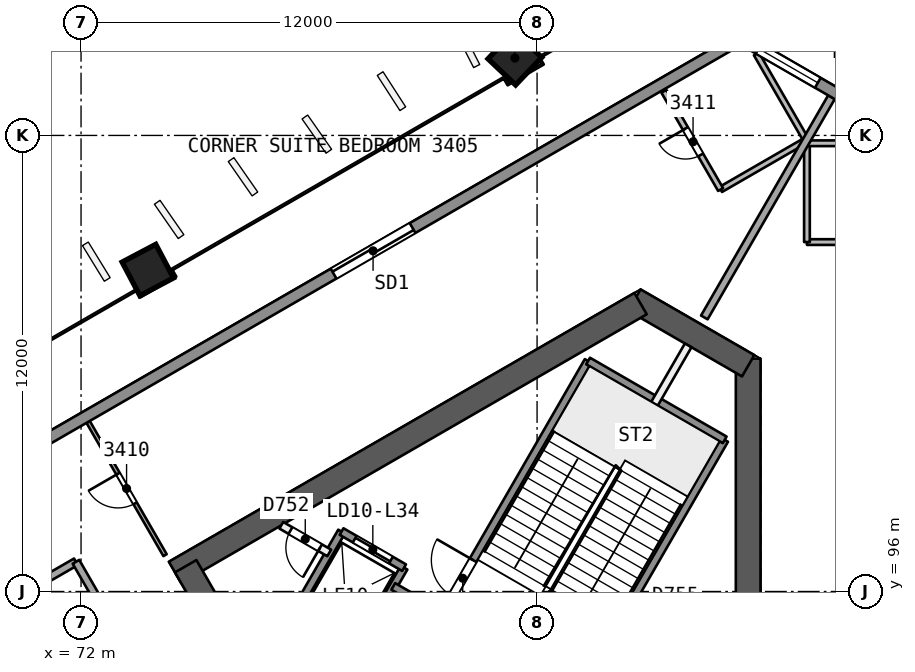
"""IFC4 building model, lengths in metres.
Left out: names, types, materials, properties, quantities, classifications, styles, units other than length and angle.
Written with IfcOpenShell. Run it as: python <this file> out.ifc"""

import sys

from ifc_helpers import new_model, si_unit, direction, frame, frame_2d, origin, origin_2d, place, context, subcontext, project, spatial, rectangle, extrude, element, fill, save


model = new_model("IFC4")
c1 = context("Model", 3, precision=1e-05, world=origin(), true_north=direction((0.0, 1.0)))
c2 = subcontext(c1, "Body", "Model", "MODEL_VIEW")
j1 = project(units=[si_unit("LENGTHUNIT", "METRE"), si_unit("PLANEANGLEUNIT", "RADIAN")], contexts=[c1])
p1 = place(None, origin())
s1 = spatial("IfcSite", under=j1, at=p1, CompositionType="ELEMENT")
p2 = place(p1, origin())
s2 = spatial("IfcBuilding", under=s1, at=p2, CompositionType="ELEMENT")
p3 = place(p2, frame((0.0, 0.0, 140.1)))
s3 = spatial("IfcBuildingStorey", under=s2, at=p3, CompositionType="ELEMENT", Elevation=140.1)
p4 = place(p3, frame((89.555, 88.119, 0.0), z_axis=(0.0, 0.0, 1.0), x_axis=(0.0, 1.0, 0.0)))
e1 = element("IfcWall", 1, at=p4, inside=s3, PredefinedType="SHEAR", context=c2, shape_type="SweptSolid", body=[
    extrude(rectangle(XDim=14.009, YDim=0.65, at=frame_2d((7.004, 0.0))), origin(), (0.0, 0.0, 1.0), 3.7),
])
p5 = place(p3, frame((89.555, 101.94, 0.0), z_axis=(0.0, 0.0, 1.0), x_axis=(-0.866031550877, 0.499989352773, 0.0)))
e2 = element("IfcWall", 2, at=p5, inside=s3, PredefinedType="SHEAR", context=c2, shape_type="SweptSolid", body=[
    extrude(rectangle(XDim=3.458, YDim=0.65, at=frame_2d((1.729, 0.0))), origin(), (0.0, 0.0, 1.0), 3.7),
])
p6 = place(p3, frame((86.723, 103.575, 0.0), z_axis=(0.0, 0.0, 1.0), x_axis=(-0.866031824457, -0.499988878904, 0.0)))
e3 = element("IfcWall", 3, at=p6, inside=s3, PredefinedType="SHEAR", context=c2, shape_type="SweptSolid", body=[
    extrude(rectangle(XDim=14.146, YDim=0.65, at=frame_2d((7.073, 0.0))), origin(), (0.0, 0.0, 1.0), 3.7),
])
p7 = place(p3, frame((74.754, 96.665, 0.0), z_axis=(0.0, 0.0, 1.0), x_axis=(0.500011799426, -0.866018591275, 0.0)))
e4 = element("IfcWall", 4, at=p7, inside=s3, PredefinedType="SHEAR", context=c2, shape_type="SweptSolid", body=[
    extrude(rectangle(XDim=10.055, YDim=0.65, at=frame_2d((5.027, 0.0))), origin(), (0.0, 0.0, 1.0), 3.7),
])
p8 = place(p7, frame((7.905, 0.0, 0.0)))
e5 = element("IfcOpeningElement", 5, at=p8, cuts=e4, PredefinedType="OPENING", context=c2, shape_type="SweptSolid", body=[
    extrude(rectangle(XDim=1.2, YDim=2.1, at=frame_2d((0.6, 1.05))), frame((0.0, 0.335, 0.0), z_axis=(0.0, -1.0, 0.0), x_axis=(1.0, 0.0, 0.0)), (0.0, 0.0, 1.0), 0.671),
])
p9 = place(p3, frame((93.096, 111.344, 0.0), z_axis=(-0.017607037296, -0.030466109479, 0.999380712447), x_axis=(0.86581098392, -0.500371202332, 2.457e-09)))
e6 = element("IfcColumn", 6, at=p9, inside=s3, PredefinedType="COLUMN", context=c2, shape_type="SweptSolid", body=[
    extrude(rectangle(XDim=2.4, YDim=2.4, at=origin_2d()), origin(), (0.0, 0.0, 1.0), 3.702),
])
p10 = place(p3, frame((83.426, 110.069, 0.0), z_axis=(-0.008376454378, -0.028163354484, 0.999568237028), x_axis=(0.865850871468, 0.499846877556, 0.02133933866)))
e7 = element("IfcColumn", 7, at=p10, inside=s3, PredefinedType="COLUMN", context=c2, shape_type="SweptSolid", body=[
    extrude(rectangle(XDim=1.0, YDim=1.0, at=origin_2d()), origin(), (0.0, 0.0, 1.0), 3.702),
])
p11 = place(p3, frame((73.756, 104.486, 0.0), z_axis=(0.000857578916, -0.022824792675, 0.999739112668), x_axis=(0.866060219769, 0.499825848733, 0.01066848966)))
e8 = element("IfcColumn", 8, at=p11, inside=s3, PredefinedType="COLUMN", context=c2, shape_type="SweptSolid", body=[
    extrude(rectangle(XDim=1.0, YDim=1.0, at=origin_2d()), origin(), (0.0, 0.0, 1.0), 3.701),
])
p12 = place(p3, frame((94.087, 105.194, 0.0), z_axis=(0.0, 0.0, 1.0), x_axis=(-1.0, 0.0, 0.0)))
e9 = element("IfcWall", 9, at=p12, inside=s3, PredefinedType="PARTITIONING", context=c2, shape_type="SweptSolid", body=[
    extrude(rectangle(XDim=2.986, YDim=0.15, at=frame_2d((1.493, 0.0))), origin(), (0.0, 0.0, 1.0), 3.25),
])
p13 = place(p12, frame((1.136, 0.0, 0.0)))
e10 = element("IfcOpeningElement", 10, at=p13, cuts=e9, PredefinedType="OPENING", context=c2, shape_type="SweptSolid", body=[
    extrude(rectangle(XDim=0.8, YDim=2.1, at=frame_2d((0.4, 1.05))), frame((0.0, 0.085, 0.0), z_axis=(0.0, -1.0, 0.0), x_axis=(1.0, 0.0, 0.0)), (0.0, 0.0, 1.0), 0.171),
])
p14 = place(p3, frame((91.102, 105.194, 0.0), z_axis=(0.0, 0.0, 1.0), x_axis=(0.0, 1.0, 0.0)))
e11 = element("IfcWall", 11, at=p14, inside=s3, PredefinedType="PARTITIONING", context=c2, shape_type="SweptSolid", body=[
    extrude(rectangle(XDim=2.6, YDim=0.15, at=frame_2d((1.3, 0.0))), origin(), (0.0, 0.0, 1.0), 3.25),
])
p15 = place(p3, frame((91.102, 107.794, 0.0), z_axis=(0.0, 0.0, 1.0), x_axis=(1.0, 0.0, 0.0)))
e12 = element("IfcWall", 12, at=p15, inside=s3, PredefinedType="PARTITIONING", context=c2, shape_type="SweptSolid", body=[
    extrude(rectangle(XDim=2.744, YDim=0.15, at=frame_2d((1.372, 0.0))), origin(), (0.0, 0.0, 1.0), 3.25),
])
p16 = place(p3, frame((91.747, 109.006, 0.0), z_axis=(0.0, 0.0, 1.0), x_axis=(-0.499973018359, -0.866040981082, 0.0)))
e13 = element("IfcWall", 13, at=p16, inside=s3, PredefinedType="PARTITIONING", context=c2, shape_type="SweptSolid", body=[
    extrude(rectangle(XDim=6.691, YDim=0.2, at=frame_2d((3.346, 0.0))), origin(), (0.0, 0.0, 1.0), 3.25),
])
p17 = place(p3, frame((74.21, 96.956, 0.0), z_axis=(0.0, 0.0, 1.0), x_axis=(-0.499997320042, 0.866026951053, 0.0)))
e14 = element("IfcWall", 14, at=p17, inside=s3, PredefinedType="PARTITIONING", context=c2, shape_type="SweptSolid", body=[
    extrude(rectangle(XDim=4.049, YDim=0.1, at=frame_2d((2.025, 0.0))), origin(), (0.0, 0.0, 1.0), 3.25),
])
p18 = place(p17, frame((1.575, 0.0, 0.0)))
e15 = element("IfcOpeningElement", 15, at=p18, cuts=e14, PredefinedType="OPENING", context=c2, shape_type="SweptSolid", body=[
    extrude(rectangle(XDim=0.9, YDim=2.1, at=frame_2d((0.45, 1.05))), frame((0.0, 0.061, 0.0), z_axis=(0.0, -1.0, 0.0), x_axis=(1.0, 0.0, 0.0)), (0.0, 0.0, 1.0), 0.121),
])
p19 = place(p3, frame((70.134, 95.781, 0.0), z_axis=(0.0, 0.0, 1.0), x_axis=(0.866010750942, 0.50002537861, 0.0)))
e16 = element("IfcWall", 16, at=p19, inside=s3, PredefinedType="PARTITIONING", context=c2, shape_type="SweptSolid", body=[
    extrude(rectangle(XDim=2.0, YDim=0.2, at=frame_2d((1.0, 0.0))), origin(), (0.0, 0.0, 1.0), 3.25),
])
p20 = place(p3, frame((71.866, 96.781, 0.0), z_axis=(0.0, 0.0, 1.0), x_axis=(0.5000018851, -0.866024315419, 0.0)))
e17 = element("IfcWall", 17, at=p20, inside=s3, PredefinedType="PARTITIONING", context=c2, shape_type="SweptSolid", body=[
    extrude(rectangle(XDim=9.0, YDim=0.2, at=frame_2d((4.5, 0.0))), origin(), (0.0, 0.0, 1.0), 3.25),
])
p21 = place(p3, frame((66.786, 97.345, 0.0), z_axis=(0.0, 0.0, 1.0), x_axis=(0.500002984678, -0.866023680573, 0.0)))
e18 = element("IfcWall", 18, at=p21, inside=s3, PredefinedType="PARTITIONING", context=c2, shape_type="SweptSolid", body=[
    extrude(rectangle(XDim=12.028, YDim=0.2, at=frame_2d((6.014, 0.0))), origin(), (0.0, 0.0, 1.0), 3.25),
])
p22 = place(p3, frame((89.77, 110.147, 0.0), z_axis=(0.0, 0.0, 1.0), x_axis=(0.500015355683, -0.866016537995, 0.0)))
e19 = element("IfcWall", 19, at=p22, inside=s3, PredefinedType="PARTITIONING", context=c2, shape_type="SweptSolid", body=[
    extrude(rectangle(XDim=2.622, YDim=0.15, at=frame_2d((1.311, 0.0))), origin(), (0.0, 0.0, 1.0), 3.25),
])
p23 = place(p3, frame((91.081, 107.877, 0.0), z_axis=(0.0, 0.0, 1.0), x_axis=(-0.866021400173, -0.500006934395, 0.0)))
e20 = element("IfcWall", 20, at=p23, inside=s3, PredefinedType="PARTITIONING", context=c2, shape_type="SweptSolid", body=[
    extrude(rectangle(XDim=2.6, YDim=0.15, at=frame_2d((1.3, 0.0))), origin(), (0.0, 0.0, 1.0), 3.25),
])
p24 = place(p3, frame((88.829, 106.577, 0.0), z_axis=(0.0, 0.0, 1.0), x_axis=(-0.499956044622, 0.866050779946, 0.0)))
e21 = element("IfcWall", 21, at=p24, inside=s3, PredefinedType="PARTITIONING", context=c2, shape_type="SweptSolid", body=[
    extrude(rectangle(XDim=2.986, YDim=0.15, at=frame_2d((1.493, 0.0))), origin(), (0.0, 0.0, 1.0), 3.25),
])
p25 = place(p24, frame((1.05, 0.0, 0.0)))
e22 = element("IfcOpeningElement", 22, at=p25, cuts=e21, PredefinedType="OPENING", context=c2, shape_type="SweptSolid", body=[
    extrude(rectangle(XDim=0.8, YDim=2.1, at=frame_2d((0.4, 1.05))), frame((0.0, 0.085, 0.0), z_axis=(0.0, -1.0, 0.0), x_axis=(1.0, 0.0, 0.0)), (0.0, 0.0, 1.0), 0.171),
])
p26 = place(p3, frame((89.365, 110.553, 0.0), z_axis=(0.0, 0.0, 1.0), x_axis=(0.866019999656, -0.500009360108, 0.0)))
e23 = element("IfcWall", 23, at=p26, inside=s3, PredefinedType="SOLIDWALL", context=c2, shape_type="SweptSolid", body=[
    extrude(rectangle(XDim=5.672, YDim=0.3, at=frame_2d((2.836, 0.0))), origin(), (0.0, 0.0, 1.0), 3.25),
])
p27 = place(p26, frame((3.396, 0.0, 0.9)))
e24 = element("IfcOpeningElement", 24, at=p27, cuts=e23, PredefinedType="OPENING", context=c2, shape_type="SweptSolid", body=[
    extrude(rectangle(XDim=1.8, YDim=1.5, at=frame_2d((0.9, 0.75))), frame((0.0, 0.161, 0.0), z_axis=(0.0, -1.0, 0.0), x_axis=(1.0, 0.0, 0.0)), (0.0, 0.0, 1.0), 0.321),
])
p28 = place(p26, frame((0.535, 0.0, 0.9)))
e25 = element("IfcOpeningElement", 25, at=p28, cuts=e23, PredefinedType="OPENING", context=c2, shape_type="SweptSolid", body=[
    extrude(rectangle(XDim=1.8, YDim=1.5, at=frame_2d((0.9, 0.75))), frame((0.0, 0.161, 0.0), z_axis=(0.0, -1.0, 0.0), x_axis=(1.0, 0.0, 0.0)), (0.0, 0.0, 1.0), 0.321),
])
p29 = place(p3, frame((41.358, 82.836, 0.0), z_axis=(0.0, 0.0, 1.0), x_axis=(0.866024602029, 0.500001388679, 0.0)))
e26 = element("IfcWall", 26, at=p29, inside=s3, PredefinedType="SOLIDWALL", context=c2, shape_type="SweptSolid", body=[
    extrude(rectangle(XDim=55.434, YDim=0.3, at=frame_2d((27.717, 0.0))), origin(), (0.0, 0.0, 1.0), 3.25),
])
p30 = place(p29, frame((26.361, 0.0, 0.0)))
e27 = element("IfcOpeningElement", 27, at=p30, cuts=e26, PredefinedType="OPENING", context=c2, shape_type="SweptSolid", body=[
    extrude(rectangle(XDim=2.4, YDim=2.4, at=frame_2d((1.2, 1.2))), frame((0.0, 0.161, 0.0), z_axis=(0.0, -1.0, 0.0), x_axis=(1.0, 0.0, 0.0)), (0.0, 0.0, 1.0), 0.321),
])
p31 = place(p29, frame((31.194, 0.0, 0.0)))
e28 = element("IfcOpeningElement", 28, at=p31, cuts=e26, PredefinedType="OPENING", context=c2, shape_type="SweptSolid", body=[
    extrude(rectangle(XDim=2.4, YDim=2.4, at=frame_2d((1.2, 1.2))), frame((0.0, 0.161, 0.0), z_axis=(0.0, -1.0, 0.0), x_axis=(1.0, 0.0, 0.0)), (0.0, 0.0, 1.0), 0.321),
])
p32 = place(p29, frame((43.056, 0.0, 0.0)))
e29 = element("IfcOpeningElement", 29, at=p32, cuts=e26, PredefinedType="OPENING", context=c2, shape_type="SweptSolid", body=[
    extrude(rectangle(XDim=2.4, YDim=2.4, at=frame_2d((1.2, 1.2))), frame((0.0, 0.161, 0.0), z_axis=(0.0, -1.0, 0.0), x_axis=(1.0, 0.0, 0.0)), (0.0, 0.0, 1.0), 0.321),
])
p33 = place(p29, frame((11.68, 0.0, 0.0)))
e30 = element("IfcOpeningElement", 30, at=p33, cuts=e26, PredefinedType="OPENING", context=c2, shape_type="SweptSolid", body=[
    extrude(rectangle(XDim=2.4, YDim=2.4, at=frame_2d((1.2, 1.2))), frame((0.0, 0.161, 0.0), z_axis=(0.0, -1.0, 0.0), x_axis=(1.0, 0.0, 0.0)), (0.0, 0.0, 1.0), 0.321),
])
p34 = place(p3, frame((85.087, 93.321, 0.0), z_axis=(0.0, 0.0, 1.0), x_axis=(0.500019787375, 0.866013979237, 0.0)))
e31 = element("IfcWall", 31, at=p34, inside=s3, PredefinedType="SOLIDWALL", context=c2, shape_type="SweptSolid", body=[
    extrude(rectangle(XDim=7.7, YDim=0.2, at=frame_2d((3.85, 0.0))), origin(), (0.0, 0.0, 1.0), 3.25),
])
p35 = place(p3, frame((87.09, 100.94, 0.0), z_axis=(0.0, 0.0, 1.0), x_axis=(0.499944938281, 0.866057191349, 0.0)))
e32 = element("IfcWall", 32, at=p35, inside=s3, PredefinedType="PARTITIONING", context=c2, shape_type="SweptSolid", body=[
    extrude(rectangle(XDim=1.773, YDim=0.2, at=frame_2d((0.887, 0.0))), origin(), (0.0, 0.0, 1.0), 3.25),
])
p36 = place(p3, frame((81.493, 95.396, 0.0), z_axis=(0.0, 0.0, 1.0), x_axis=(0.500006057782, 0.866021906294, 0.0)))
e33 = element("IfcWall", 33, at=p36, inside=s3, PredefinedType="SOLIDWALL", context=c2, shape_type="SweptSolid", body=[
    extrude(rectangle(XDim=7.7, YDim=0.2, at=frame_2d((3.85, 0.0))), origin(), (0.0, 0.0, 1.0), 3.25),
])
p37 = place(p36, frame((0.55, 0.0, 0.0)))
e34 = element("IfcOpeningElement", 34, at=p37, cuts=e33, PredefinedType="OPENING", context=c2, shape_type="SweptSolid", body=[
    extrude(rectangle(XDim=1.1, YDim=2.1, at=frame_2d((0.55, 1.05))), frame((0.0, 0.11, 0.0), z_axis=(0.0, -1.0, 0.0), x_axis=(1.0, 0.0, 0.0)), (0.0, 0.0, 1.0), 0.221),
])
for number, where, z_axis, x_axis in (
    (35, (78.976, 93.986, 0.0), (0.0, 0.0, 1.0), (0.5, 0.866, 0.0)),
    (36, (77.33, 94.936, 0.0), (0.0, 0.0, 1.0), (0.5, 0.866, 0.0)),
):
    element("IfcWall", number, at=place(p3, frame(where, z_axis=z_axis, x_axis=x_axis)), inside=s3, PredefinedType="SOLIDWALL", context=c2, shape_type="SweptSolid", body=[
        extrude(rectangle(XDim=3.05, YDim=0.2, at=frame_2d((1.525, 0.0))), origin(), (0.0, 0.0, 1.0), 3.25),
    ])
p38 = place(p3, frame((78.53, 97.014, 0.0), z_axis=(0.0, 0.0, 1.0), x_axis=(-0.866045896294, 0.499964504253, 0.0)))
e37 = element("IfcWall", 37, at=p38, inside=s3, PredefinedType="PARTITIONING", context=c2, shape_type="SweptSolid", body=[
    extrude(rectangle(XDim=1.455, YDim=0.2, at=frame_2d((0.728, 0.0))), origin(), (0.0, 0.0, 1.0), 3.25),
])
p39 = place(p38, frame((0.278, 0.0, 0.0)))
e38 = element("IfcOpeningElement", 38, at=p39, cuts=e37, PredefinedType="OPENING", context=c2, shape_type="SweptSolid", body=[
    extrude(rectangle(XDim=0.9, YDim=2.1, at=frame_2d((0.45, 1.05))), frame((0.0, 0.11, 0.0), z_axis=(0.0, -1.0, 0.0), x_axis=(1.0, 0.0, 0.0)), (0.0, 0.0, 1.0), 0.221),
])
p40 = place(p3, frame((88.01, 91.634, 0.0), z_axis=(0.0, 0.0, 1.0), x_axis=(-0.866024315419, 0.5000018851, 0.0)))
e39 = element("IfcWall", 39, at=p40, inside=s3, PredefinedType="SOLIDWALL", context=c2, shape_type="SweptSolid", body=[
    extrude(rectangle(XDim=9.0, YDim=0.2, at=frame_2d((4.5, 0.0))), origin(), (0.0, 0.0, 1.0), 3.25),
])
p41 = place(p3, frame((80.5, 96.627, 0.0), z_axis=(0.0, 0.0, 1.0), x_axis=(-0.86601224135, 0.500022797313, 0.0)))
e40 = element("IfcWall", 40, at=p41, inside=s3, PredefinedType="SOLIDWALL", context=c2, shape_type="SweptSolid", body=[
    extrude(rectangle(XDim=1.9, YDim=0.2, at=frame_2d((0.95, 0.0))), origin(), (0.0, 0.0, 1.0), 3.25),
])
p42 = place(p41, frame((0.4, 0.0, 0.0)))
e41 = element("IfcOpeningElement", 41, at=p42, cuts=e40, PredefinedType="OPENING", context=c2, shape_type="SweptSolid", body=[
    extrude(rectangle(XDim=1.1, YDim=2.1, at=frame_2d((0.55, 1.05))), frame((0.0, 0.11, 0.0), z_axis=(0.0, -1.0, 0.0), x_axis=(1.0, 0.0, 0.0)), (0.0, 0.0, 1.0), 0.221),
])
p43 = place(p3, frame((88.937, 99.99, 0.0), z_axis=(0.0, 0.0, 1.0), x_axis=(-0.866004344652, 0.500036473714, 0.0)))
e42 = element("IfcWall", 42, at=p43, inside=s3, PredefinedType="SOLIDWALL", context=c2, shape_type="SweptSolid", body=[
    extrude(rectangle(XDim=4.15, YDim=0.2, at=frame_2d((2.075, 0.0))), origin(), (0.0, 0.0, 1.0), 3.25),
])
p44 = place(p18, origin())
e43 = element("IfcDoor", 43, at=p44, inside=s3, OperationType="SINGLE_SWING_RIGHT", PredefinedType="NOTDEFINED", context=c2, shape_type="SweptSolid", body=[
    extrude(rectangle(XDim=0.9, YDim=2.1, at=frame_2d((0.45, 1.05))), frame((0.0, 0.025, 0.0), z_axis=(0.0, -1.0, 0.0), x_axis=(1.0, 0.0, 0.0)), (0.0, 0.0, 1.0), 0.05),
])
fill(e15, e43)
p45 = place(p25, origin())
e44 = element("IfcDoor", 44, at=p45, inside=s3, OperationType="SINGLE_SWING_RIGHT", PredefinedType="NOTDEFINED", context=c2, shape_type="SweptSolid", body=[
    extrude(rectangle(XDim=0.8, YDim=2.1, at=frame_2d((0.4, 1.05))), frame((0.0, 0.025, 0.0), z_axis=(0.0, -1.0, 0.0), x_axis=(1.0, 0.0, 0.0)), (0.0, 0.0, 1.0), 0.05),
])
fill(e22, e44)
p46 = place(p28, origin())
e45 = element("IfcWindow", 45, at=p46, inside=s3, PartitioningType="SINGLE_PANEL", PredefinedType="WINDOW", context=c2, shape_type="SweptSolid", body=[
    extrude(rectangle(XDim=1.8, YDim=1.5, at=frame_2d((0.9, 0.75))), frame((0.0, 0.03, 0.0), z_axis=(0.0, -1.0, 0.0), x_axis=(1.0, 0.0, 0.0)), (0.0, 0.0, 1.0), 0.06),
])
fill(e25, e45)
p47 = place(p32, origin())
e46 = element("IfcDoor", 46, at=p47, inside=s3, OperationType="SLIDING_TO_LEFT", PredefinedType="NOTDEFINED", context=c2, shape_type="SweptSolid", body=[
    extrude(rectangle(XDim=2.4, YDim=2.4, at=frame_2d((1.2, 1.2))), frame((0.0, 0.025, 0.0), z_axis=(0.0, -1.0, 0.0), x_axis=(1.0, 0.0, 0.0)), (0.0, 0.0, 1.0), 0.05),
])
fill(e29, e46)
p48 = place(p42, origin())
e47 = element("IfcDoor", 47, at=p48, inside=s3, OperationType="SLIDING_TO_RIGHT", PredefinedType="NOTDEFINED", context=c2, shape_type="SweptSolid", body=[
    extrude(rectangle(XDim=1.1, YDim=2.1, at=frame_2d((0.55, 1.05))), frame((0.0, 0.025, 0.0), z_axis=(0.0, -1.0, 0.0), x_axis=(1.0, 0.0, 0.0)), (0.0, 0.0, 1.0), 0.05),
])
fill(e41, e47)
p49 = place(p39, origin())
e48 = element("IfcDoor", 48, at=p49, inside=s3, OperationType="SINGLE_SWING_LEFT", PredefinedType="NOTDEFINED", context=c2, shape_type="SweptSolid", body=[
    extrude(rectangle(XDim=0.9, YDim=2.1, at=frame_2d((0.45, 1.05))), frame((0.0, 0.025, 0.0), z_axis=(0.0, -1.0, 0.0), x_axis=(1.0, 0.0, 0.0)), (0.0, 0.0, 1.0), 0.05),
])
fill(e38, e48)
p50 = place(p37, origin())
e49 = element("IfcDoor", 49, at=p50, inside=s3, OperationType="SINGLE_SWING_RIGHT", PredefinedType="NOTDEFINED", context=c2, shape_type="SweptSolid", body=[
    extrude(rectangle(XDim=1.1, YDim=2.1, at=frame_2d((0.55, 1.05))), frame((0.0, 0.025, 0.0), z_axis=(0.0, -1.0, 0.0), x_axis=(1.0, 0.0, 0.0)), (0.0, 0.0, 1.0), 0.05),
])
fill(e34, e49)
save(model, sys.argv[1])
